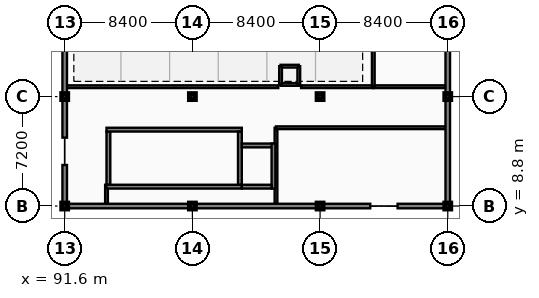
"""IFC4 building model, lengths in metres.
Left out: names, types, materials, properties, quantities, classifications, styles, units other than length and angle.
Written with IfcOpenShell. Run it as: python <this file> out.ifc"""

import sys

from ifc_helpers import new_model, si_unit, direction, frame, frame_2d, origin, origin_2d, place, context, subcontext, project, spatial, rectangle, extrude, element, fill, save


model = new_model("IFC4")
c1 = context("Model", 3, precision=1e-05, world=origin(), true_north=direction((0.0, 1.0)))
c2 = subcontext(c1, "Body", "Model", "MODEL_VIEW")
j1 = project(units=[si_unit("LENGTHUNIT", "METRE"), si_unit("PLANEANGLEUNIT", "RADIAN")], contexts=[c1])
p1 = place(None, origin())
s1 = spatial("IfcSite", under=j1, at=p1, CompositionType="ELEMENT")
p2 = place(p1, origin())
s2 = spatial("IfcBuilding", under=s1, at=p2, CompositionType="ELEMENT")
p3 = place(p2, frame((0.0, 0.0, 13.8)))
s3 = spatial("IfcBuildingStorey", under=s2, at=p3, CompositionType="ELEMENT", Elevation=13.8)
for number, where, z_axis, x_axis in (
    (1, (91.6, 8.8, 0.0), (0.0, 0.0, 1.0), (1.0, 0.0, 0.0)),
    (2, (91.6, 16.0, 0.0), (0.0, 0.0, 1.0), (1.0, 0.0, 0.0)),
    (3, (100.0, 8.8, 0.0), (0.0, 0.0, 1.0), (1.0, 0.0, 0.0)),
    (4, (100.0, 16.0, 0.0), (0.0, 0.0, 1.0), (1.0, 0.0, 0.0)),
    (5, (108.4, 8.8, 0.0), (0.0, 0.0, 1.0), (1.0, 0.0, 0.0)),
    (6, (108.4, 16.0, 0.0), (0.0, 0.0, 1.0), (1.0, 0.0, 0.0)),
    (7, (116.8, 8.8, 0.0), (0.0, 0.0, 1.0), (1.0, 0.0, 0.0)),
    (8, (116.8, 16.0, 0.0), (0.0, 0.0, 1.0), (1.0, 0.0, 0.0)),
):
    element("IfcColumn", number, at=place(p3, frame(where, z_axis=z_axis, x_axis=x_axis)), inside=s3, PredefinedType="COLUMN", context=c2, shape_type="SweptSolid", body=[
        extrude(rectangle(XDim=0.4, YDim=0.4, at=origin_2d()), origin(), (0.0, 0.0, 1.0), 3.9),
    ])
p4 = place(p3, frame((94.35, 8.96, 0.0), z_axis=(0.0, 0.0, 1.0), x_axis=(0.0, 1.0, 0.0)))
e9 = element("IfcWall", 9, at=p4, inside=s3, PredefinedType="PARTITIONING", context=c2, shape_type="SweptSolid", body=[
    extrude(rectangle(XDim=1.24, YDim=0.18, at=frame_2d((0.62, 0.0))), origin(), (0.0, 0.0, 1.0), 3.01),
])
p5 = place(p3, frame((105.5, 8.94, 0.0), z_axis=(0.0, 0.0, 1.0), x_axis=(0.0, 1.0, 0.0)))
e10 = element("IfcWall", 10, at=p5, inside=s3, PredefinedType="PARTITIONING", context=c2, shape_type="SweptSolid", body=[
    extrude(rectangle(XDim=5.01, YDim=0.18, at=frame_2d((2.505, 0.0))), origin(), (0.0, 0.0, 1.0), 3.01),
])
p6 = place(p3, frame((105.5, 13.95, 0.0), z_axis=(0.0, 0.0, 1.0), x_axis=(1.0, 0.0, 0.0)))
e11 = element("IfcWall", 11, at=p6, inside=s3, PredefinedType="PARTITIONING", context=c2, shape_type="SweptSolid", body=[
    extrude(rectangle(XDim=11.16, YDim=0.18, at=frame_2d((5.58, 0.0))), origin(), (0.0, 0.0, 1.0), 3.09),
])
p7 = place(p6, frame((5.08, 0.0, -0.01)))
e12 = element("IfcOpeningElement", 12, at=p7, cuts=e11, PredefinedType="OPENING", context=c2, shape_type="SweptSolid", body=[
    extrude(rectangle(XDim=1.0, YDim=2.16, at=frame_2d((0.5, 1.08))), frame((0.0, 0.1, 0.0), z_axis=(0.0, -1.0, 0.0), x_axis=(1.0, 0.0, 0.0)), (0.0, 0.0, 1.0), 0.2),
])
p8 = place(p3, frame((91.74, 16.65, 0.0), z_axis=(0.0, 0.0, 1.0), x_axis=(1.0, 0.0, 0.0)))
e13 = element("IfcWall", 13, at=p8, inside=s3, PredefinedType="PARTITIONING", context=c2, shape_type="SweptSolid", body=[
    extrude(rectangle(XDim=13.91, YDim=0.18, at=frame_2d((6.955, 0.0))), origin(), (0.0, 0.0, 1.0), 3.09),
])
p9 = place(p8, frame((5.54, 0.0, -0.01)))
e14 = element("IfcOpeningElement", 14, at=p9, cuts=e13, PredefinedType="OPENING", context=c2, shape_type="SweptSolid", body=[
    extrude(rectangle(XDim=1.6, YDim=2.21, at=frame_2d((0.8, 1.105))), frame((0.0, 0.1, 0.0), z_axis=(0.0, -1.0, 0.0), x_axis=(1.0, 0.0, 0.0)), (0.0, 0.0, 1.0), 0.2),
])
p10 = place(p3, frame((107.15, 16.65, 0.0), z_axis=(0.0, 0.0, 1.0), x_axis=(1.0, 0.0, 0.0)))
e15 = element("IfcWall", 15, at=p10, inside=s3, PredefinedType="PARTITIONING", context=c2, shape_type="SweptSolid", body=[
    extrude(rectangle(XDim=4.75, YDim=0.18, at=frame_2d((2.375, 0.0))), origin(), (0.0, 0.0, 1.0), 3.09),
])
p11 = place(p3, frame((111.9, 16.65, 0.0), z_axis=(0.0, 0.0, 1.0), x_axis=(1.0, 0.0, 0.0)))
e16 = element("IfcWall", 16, at=p11, inside=s3, PredefinedType="PARTITIONING", context=c2, shape_type="SweptSolid", body=[
    extrude(rectangle(XDim=4.76, YDim=0.18, at=frame_2d((2.38, 0.0))), origin(), (0.0, 0.0, 1.0), 3.09),
])
p12 = place(p11, frame((1.88, 0.0, -0.01)))
e17 = element("IfcOpeningElement", 17, at=p12, cuts=e16, PredefinedType="OPENING", context=c2, shape_type="SweptSolid", body=[
    extrude(rectangle(XDim=1.0, YDim=2.16, at=frame_2d((0.5, 1.08))), frame((0.0, 0.1, 0.0), z_axis=(0.0, -1.0, 0.0), x_axis=(1.0, 0.0, 0.0)), (0.0, 0.0, 1.0), 0.2),
])
p13 = place(p3, frame((111.9, 16.65, 0.0), z_axis=(0.0, 0.0, 1.0), x_axis=(0.0, 1.0, 0.0)))
e18 = element("IfcWall", 18, at=p13, inside=s3, PredefinedType="PARTITIONING", context=c2, shape_type="SweptSolid", body=[
    extrude(rectangle(XDim=6.41, YDim=0.18, at=frame_2d((3.205, 0.0))), origin(), (0.0, 0.0, 1.0), 3.01),
])
p14 = place(p3, frame((91.6, 8.8, 0.0), z_axis=(0.0, 0.0, 1.0), x_axis=(1.0, 0.0, 0.0)))
e19 = element("IfcWall", 19, at=p14, inside=s3, PredefinedType="SOLIDWALL", context=c2, shape_type="SweptSolid", body=[
    extrude(rectangle(XDim=8.4, YDim=0.3, at=frame_2d((4.2, 0.0))), origin(), (0.0, 0.0, 1.0), 3.01),
])
p15 = place(p14, frame((0.46, 0.0, 0.85)))
e20 = element("IfcOpeningElement", 20, at=p15, cuts=e19, PredefinedType="OPENING", context=c2, shape_type="SweptSolid", body=[
    extrude(rectangle(XDim=0.9, YDim=2.02, at=frame_2d((0.45, 1.01))), frame((0.0, 0.16, 0.0), z_axis=(0.0, -1.0, 0.0), x_axis=(1.0, 0.0, 0.0)), (0.0, 0.0, 1.0), 0.32),
])
p16 = place(p14, frame((6.86, 0.0, 0.85)))
e21 = element("IfcOpeningElement", 21, at=p16, cuts=e19, PredefinedType="OPENING", context=c2, shape_type="SweptSolid", body=[
    extrude(rectangle(XDim=0.9, YDim=2.02, at=frame_2d((0.45, 1.01))), frame((0.0, 0.16, 0.0), z_axis=(0.0, -1.0, 0.0), x_axis=(1.0, 0.0, 0.0)), (0.0, 0.0, 1.0), 0.32),
])
p17 = place(p3, frame((100.0, 8.8, 0.0), z_axis=(0.0, 0.0, 1.0), x_axis=(1.0, 0.0, 0.0)))
e22 = element("IfcWall", 22, at=p17, inside=s3, PredefinedType="SOLIDWALL", context=c2, shape_type="SweptSolid", body=[
    extrude(rectangle(XDim=8.4, YDim=0.3, at=frame_2d((4.2, 0.0))), origin(), (0.0, 0.0, 1.0), 3.01),
])
p18 = place(p17, frame((0.46, 0.0, 0.85)))
e23 = element("IfcOpeningElement", 23, at=p18, cuts=e22, PredefinedType="OPENING", context=c2, shape_type="SweptSolid", body=[
    extrude(rectangle(XDim=0.9, YDim=2.02, at=frame_2d((0.45, 1.01))), frame((0.0, 0.16, 0.0), z_axis=(0.0, -1.0, 0.0), x_axis=(1.0, 0.0, 0.0)), (0.0, 0.0, 1.0), 0.32),
])
p19 = place(p17, frame((6.86, 0.0, 0.85)))
e24 = element("IfcOpeningElement", 24, at=p19, cuts=e22, PredefinedType="OPENING", context=c2, shape_type="SweptSolid", body=[
    extrude(rectangle(XDim=0.9, YDim=2.02, at=frame_2d((0.45, 1.01))), frame((0.0, 0.16, 0.0), z_axis=(0.0, -1.0, 0.0), x_axis=(1.0, 0.0, 0.0)), (0.0, 0.0, 1.0), 0.32),
])
for number, where, z_axis, x_axis in (
    (25, (108.4, 8.8, 0.0), (0.0, 0.0, 1.0), (1.0, 0.0, 0.0)),
    (26, (113.5, 8.8, 0.0), (0.0, 0.0, 1.0), (1.0, 0.0, 0.0)),
):
    element("IfcWall", number, at=place(p3, frame(where, z_axis=z_axis, x_axis=x_axis)), inside=s3, PredefinedType="SOLIDWALL", context=c2, shape_type="SweptSolid", body=[
        extrude(rectangle(XDim=3.3, YDim=0.3, at=frame_2d((1.65, 0.0))), origin(), (0.0, 0.0, 1.0), 3.01),
    ])
for number, where, z_axis, x_axis in (
    (27, (91.6, 16.0, 0.0), (0.0, 0.0, 1.0), (0.0, -1.0, 0.0)),
    (28, (91.6, 11.5, 0.0), (0.0, 0.0, 1.0), (0.0, -1.0, 0.0)),
):
    element("IfcWall", number, at=place(p3, frame(where, z_axis=z_axis, x_axis=x_axis)), inside=s3, PredefinedType="SOLIDWALL", context=c2, shape_type="SweptSolid", body=[
        extrude(rectangle(XDim=2.7, YDim=0.3, at=frame_2d((1.35, 0.0))), origin(), (0.0, 0.0, 1.0), 3.01),
    ])
p20 = place(p3, frame((91.6, 23.2, 0.0), z_axis=(0.0, 0.0, 1.0), x_axis=(0.0, -1.0, 0.0)))
e29 = element("IfcWall", 29, at=p20, inside=s3, PredefinedType="SOLIDWALL", context=c2, shape_type="SweptSolid", body=[
    extrude(rectangle(XDim=7.2, YDim=0.3, at=frame_2d((3.6, 0.0))), origin(), (0.0, 0.0, 1.0), 3.01),
])
p21 = place(p20, frame((0.46, 0.0, 0.85)))
e30 = element("IfcOpeningElement", 30, at=p21, cuts=e29, PredefinedType="OPENING", context=c2, shape_type="SweptSolid", body=[
    extrude(rectangle(XDim=0.9, YDim=2.02, at=frame_2d((0.45, 1.01))), frame((0.0, 0.16, 0.0), z_axis=(0.0, -1.0, 0.0), x_axis=(1.0, 0.0, 0.0)), (0.0, 0.0, 1.0), 0.32),
])
p22 = place(p20, frame((5.26, 0.0, 0.85)))
e31 = element("IfcOpeningElement", 31, at=p22, cuts=e29, PredefinedType="OPENING", context=c2, shape_type="SweptSolid", body=[
    extrude(rectangle(XDim=0.9, YDim=2.02, at=frame_2d((0.45, 1.01))), frame((0.0, 0.16, 0.0), z_axis=(0.0, -1.0, 0.0), x_axis=(1.0, 0.0, 0.0)), (0.0, 0.0, 1.0), 0.32),
])
p23 = place(p3, frame((116.8, 8.8, 0.0), z_axis=(0.0, 0.0, 1.0), x_axis=(0.0, 1.0, 0.0)))
e32 = element("IfcWall", 32, at=p23, inside=s3, PredefinedType="SOLIDWALL", context=c2, shape_type="SweptSolid", body=[
    extrude(rectangle(XDim=7.2, YDim=0.3, at=frame_2d((3.6, 0.0))), origin(), (0.0, 0.0, 1.0), 3.01),
])
p24 = place(p23, frame((0.46, 0.0, 0.85)))
e33 = element("IfcOpeningElement", 33, at=p24, cuts=e32, PredefinedType="OPENING", context=c2, shape_type="SweptSolid", body=[
    extrude(rectangle(XDim=0.9, YDim=2.02, at=frame_2d((0.45, 1.01))), frame((0.0, 0.16, 0.0), z_axis=(0.0, -1.0, 0.0), x_axis=(1.0, 0.0, 0.0)), (0.0, 0.0, 1.0), 0.32),
])
p25 = place(p23, frame((5.66, 0.0, 0.85)))
e34 = element("IfcOpeningElement", 34, at=p25, cuts=e32, PredefinedType="OPENING", context=c2, shape_type="SweptSolid", body=[
    extrude(rectangle(XDim=0.9, YDim=2.02, at=frame_2d((0.45, 1.01))), frame((0.0, 0.16, 0.0), z_axis=(0.0, -1.0, 0.0), x_axis=(1.0, 0.0, 0.0)), (0.0, 0.0, 1.0), 0.32),
])
p26 = place(p3, frame((116.8, 16.0, 0.0), z_axis=(0.0, 0.0, 1.0), x_axis=(0.0, 1.0, 0.0)))
e35 = element("IfcWall", 35, at=p26, inside=s3, PredefinedType="SOLIDWALL", context=c2, shape_type="SweptSolid", body=[
    extrude(rectangle(XDim=7.2, YDim=0.3, at=frame_2d((3.6, 0.0))), origin(), (0.0, 0.0, 1.0), 3.01),
])
p27 = place(p26, frame((0.86, 0.0, 0.85)))
e36 = element("IfcOpeningElement", 36, at=p27, cuts=e35, PredefinedType="OPENING", context=c2, shape_type="SweptSolid", body=[
    extrude(rectangle(XDim=0.9, YDim=2.02, at=frame_2d((0.45, 1.01))), frame((0.0, 0.16, 0.0), z_axis=(0.0, -1.0, 0.0), x_axis=(1.0, 0.0, 0.0)), (0.0, 0.0, 1.0), 0.32),
])
p28 = place(p26, frame((5.66, 0.0, 0.85)))
e37 = element("IfcOpeningElement", 37, at=p28, cuts=e35, PredefinedType="OPENING", context=c2, shape_type="SweptSolid", body=[
    extrude(rectangle(XDim=0.9, YDim=2.02, at=frame_2d((0.45, 1.01))), frame((0.0, 0.16, 0.0), z_axis=(0.0, -1.0, 0.0), x_axis=(1.0, 0.0, 0.0)), (0.0, 0.0, 1.0), 0.32),
])
p29 = place(p3, frame((94.475, 13.7, 0.0), z_axis=(0.0, 0.0, 1.0), x_axis=(0.0, -1.0, 0.0)))
e38 = element("IfcWall", 38, at=p29, inside=s3, PredefinedType="SHEAR", context=c2, shape_type="SweptSolid", body=[
    extrude(rectangle(XDim=3.5, YDim=0.25, at=frame_2d((1.75, 0.0))), origin(), (0.0, 0.0, 1.0), 3.9),
])
p30 = place(p29, frame((1.1, 0.0, -0.01)))
e39 = element("IfcOpeningElement", 39, at=p30, cuts=e38, PredefinedType="OPENING", context=c2, shape_type="SweptSolid", body=[
    extrude(rectangle(XDim=1.3, YDim=2.16, at=frame_2d((0.65, 1.08))), frame((0.0, 0.135, 0.0), z_axis=(0.0, -1.0, 0.0), x_axis=(1.0, 0.0, 0.0)), (0.0, 0.0, 1.0), 0.27),
])
for number, where, z_axis, x_axis in (
    (40, (94.35, 10.075, 0.0), (0.0, 0.0, 1.0), (1.0, 0.0, 0.0)),
    (41, (94.35, 13.825, 0.0), (0.0, 0.0, 1.0), (1.0, 0.0, 0.0)),
):
    element("IfcWall", number, at=place(p3, frame(where, z_axis=z_axis, x_axis=x_axis)), inside=s3, PredefinedType="SHEAR", context=c2, shape_type="SweptSolid", body=[
        extrude(rectangle(XDim=8.9, YDim=0.25, at=frame_2d((4.45, 0.0))), origin(), (0.0, 0.0, 1.0), 3.9),
    ])
p31 = place(p3, frame((103.125, 10.2, 0.0), z_axis=(0.0, 0.0, 1.0), x_axis=(0.0, 1.0, 0.0)))
e42 = element("IfcWall", 42, at=p31, inside=s3, PredefinedType="SHEAR", context=c2, shape_type="SweptSolid", body=[
    extrude(rectangle(XDim=3.5, YDim=0.25, at=frame_2d((1.75, 0.0))), origin(), (0.0, 0.0, 1.0), 3.9),
])
p32 = place(p3, frame((103.25, 12.785, 0.0), z_axis=(0.0, 0.0, 1.0), x_axis=(1.0, 0.0, 0.0)))
e43 = element("IfcWall", 43, at=p32, inside=s3, PredefinedType="SHEAR", context=c2, shape_type="SweptSolid", body=[
    extrude(rectangle(XDim=2.21, YDim=0.25, at=frame_2d((1.105, 0.0))), origin(), (0.0, 0.0, 1.0), 3.9),
])
p33 = place(p3, frame((105.335, 9.95, 0.0), z_axis=(0.0, 0.0, 1.0), x_axis=(0.0, 1.0, 0.0)))
e44 = element("IfcWall", 44, at=p33, inside=s3, PredefinedType="SHEAR", context=c2, shape_type="SweptSolid", body=[
    extrude(rectangle(XDim=2.96, YDim=0.25, at=frame_2d((1.48, 0.0))), origin(), (0.0, 0.0, 1.0), 3.9),
])
p34 = place(p3, frame((103.25, 10.075, 0.0), z_axis=(0.0, 0.0, 1.0), x_axis=(1.0, 0.0, 0.0)))
e45 = element("IfcWall", 45, at=p34, inside=s3, PredefinedType="SHEAR", context=c2, shape_type="SweptSolid", body=[
    extrude(rectangle(XDim=1.96, YDim=0.25, at=frame_2d((0.98, 0.0))), origin(), (0.0, 0.0, 1.0), 3.9),
])
p35 = place(p34, frame((0.43, 0.0, -0.01)))
e46 = element("IfcOpeningElement", 46, at=p35, cuts=e45, PredefinedType="OPENING", context=c2, shape_type="SweptSolid", body=[
    extrude(rectangle(XDim=1.1, YDim=2.16, at=frame_2d((0.55, 1.08))), frame((0.0, 0.135, 0.0), z_axis=(0.0, -1.0, 0.0), x_axis=(1.0, 0.0, 0.0)), (0.0, 0.0, 1.0), 0.27),
])
p36 = place(p3, frame((105.8, 16.8, 0.0), z_axis=(0.0, 0.0, 1.0), x_axis=(1.0, 0.0, 0.0)))
e47 = element("IfcWall", 47, at=p36, inside=s3, PredefinedType="SOLIDWALL", context=c2, shape_type="SweptSolid", body=[
    extrude(rectangle(XDim=1.2, YDim=0.18, at=frame_2d((0.6, 0.0))), origin(), (0.0, 0.0, 1.0), 3.69),
])
p37 = place(p36, frame((0.2, 0.0, -0.01)))
e48 = element("IfcOpeningElement", 48, at=p37, cuts=e47, PredefinedType="OPENING", context=c2, shape_type="SweptSolid", body=[
    extrude(rectangle(XDim=0.8, YDim=2.06, at=frame_2d((0.4, 1.03))), frame((0.0, 0.1, 0.0), z_axis=(0.0, -1.0, 0.0), x_axis=(1.0, 0.0, 0.0)), (0.0, 0.0, 1.0), 0.2),
])
for number, where, z_axis, x_axis in (
    (49, (107.0, 16.8, 0.0), (0.0, 0.0, 1.0), (0.0, 1.0, 0.0)),
    (50, (107.0, 18.0, 0.0), (0.0, 0.0, 1.0), (-1.0, 0.0, 0.0)),
    (51, (105.8, 18.0, 0.0), (0.0, 0.0, 1.0), (0.0, -1.0, 0.0)),
):
    element("IfcWall", number, at=place(p3, frame(where, z_axis=z_axis, x_axis=x_axis)), inside=s3, PredefinedType="SOLIDWALL", context=c2, shape_type="SweptSolid", body=[
        extrude(rectangle(XDim=1.2, YDim=0.18, at=frame_2d((0.6, 0.0))), origin(), (0.0, 0.0, 1.0), 3.69),
    ])
p38 = place(p7, frame((1.0, 0.0, 0.01), z_axis=(0.0, 0.0, 1.0), x_axis=(-1.0, 0.0, 0.0)))
e52 = element("IfcDoor", 52, at=p38, inside=s3, OperationType="SINGLE_SWING_LEFT", PredefinedType="DOOR", context=c2, shape_type="SweptSolid", body=[
    extrude(rectangle(XDim=1.0, YDim=2.15, at=frame_2d((0.5, 1.075))), frame((0.0, 0.025, 0.0), z_axis=(0.0, -1.0, 0.0), x_axis=(1.0, 0.0, 0.0)), (0.0, 0.0, 1.0), 0.05),
])
fill(e12, e52)
p39 = place(p9, frame((0.0, 0.0, 0.01)))
e53 = element("IfcDoor", 53, at=p39, inside=s3, OperationType="DOUBLE_SWING_LEFT", PredefinedType="DOOR", context=c2, shape_type="SweptSolid", body=[
    extrude(rectangle(XDim=1.6, YDim=2.2, at=frame_2d((0.8, 1.1))), frame((0.0, 0.025, 0.0), z_axis=(0.0, -1.0, 0.0), x_axis=(1.0, 0.0, 0.0)), (0.0, 0.0, 1.0), 0.05),
])
fill(e14, e53)
p40 = place(p12, frame((0.0, 0.0, 0.01)))
e54 = element("IfcDoor", 54, at=p40, inside=s3, OperationType="SINGLE_SWING_LEFT", PredefinedType="DOOR", context=c2, shape_type="SweptSolid", body=[
    extrude(rectangle(XDim=1.0, YDim=2.15, at=frame_2d((0.5, 1.075))), frame((0.0, 0.025, 0.0), z_axis=(0.0, -1.0, 0.0), x_axis=(1.0, 0.0, 0.0)), (0.0, 0.0, 1.0), 0.05),
])
fill(e17, e54)
p41 = place(p15, origin())
e55 = element("IfcWindow", 55, at=p41, inside=s3, PartitioningType="SINGLE_PANEL", PredefinedType="WINDOW", context=c2, shape_type="SweptSolid", body=[
    extrude(rectangle(XDim=0.9, YDim=2.02, at=frame_2d((0.45, 1.01))), frame((0.0, 0.03, 0.0), z_axis=(0.0, -1.0, 0.0), x_axis=(1.0, 0.0, 0.0)), (0.0, 0.0, 1.0), 0.06),
])
fill(e20, e55)
p42 = place(p16, origin())
e56 = element("IfcWindow", 56, at=p42, inside=s3, PartitioningType="SINGLE_PANEL", PredefinedType="WINDOW", context=c2, shape_type="SweptSolid", body=[
    extrude(rectangle(XDim=0.9, YDim=2.02, at=frame_2d((0.45, 1.01))), frame((0.0, 0.03, 0.0), z_axis=(0.0, -1.0, 0.0), x_axis=(1.0, 0.0, 0.0)), (0.0, 0.0, 1.0), 0.06),
])
fill(e21, e56)
p43 = place(p18, origin())
e57 = element("IfcWindow", 57, at=p43, inside=s3, PartitioningType="SINGLE_PANEL", PredefinedType="WINDOW", context=c2, shape_type="SweptSolid", body=[
    extrude(rectangle(XDim=0.9, YDim=2.02, at=frame_2d((0.45, 1.01))), frame((0.0, 0.03, 0.0), z_axis=(0.0, -1.0, 0.0), x_axis=(1.0, 0.0, 0.0)), (0.0, 0.0, 1.0), 0.06),
])
fill(e23, e57)
p44 = place(p19, origin())
e58 = element("IfcWindow", 58, at=p44, inside=s3, PartitioningType="SINGLE_PANEL", PredefinedType="WINDOW", context=c2, shape_type="SweptSolid", body=[
    extrude(rectangle(XDim=0.9, YDim=2.02, at=frame_2d((0.45, 1.01))), frame((0.0, 0.03, 0.0), z_axis=(0.0, -1.0, 0.0), x_axis=(1.0, 0.0, 0.0)), (0.0, 0.0, 1.0), 0.06),
])
fill(e24, e58)
p45 = place(p22, origin())
e59 = element("IfcWindow", 59, at=p45, inside=s3, PartitioningType="SINGLE_PANEL", PredefinedType="WINDOW", context=c2, shape_type="SweptSolid", body=[
    extrude(rectangle(XDim=0.9, YDim=2.02, at=frame_2d((0.45, 1.01))), frame((0.0, 0.03, 0.0), z_axis=(0.0, -1.0, 0.0), x_axis=(1.0, 0.0, 0.0)), (0.0, 0.0, 1.0), 0.06),
])
fill(e31, e59)
p46 = place(p24, origin())
e60 = element("IfcWindow", 60, at=p46, inside=s3, PartitioningType="SINGLE_PANEL", PredefinedType="WINDOW", context=c2, shape_type="SweptSolid", body=[
    extrude(rectangle(XDim=0.9, YDim=2.02, at=frame_2d((0.45, 1.01))), frame((0.0, 0.03, 0.0), z_axis=(0.0, -1.0, 0.0), x_axis=(1.0, 0.0, 0.0)), (0.0, 0.0, 1.0), 0.06),
])
fill(e33, e60)
p47 = place(p25, origin())
e61 = element("IfcWindow", 61, at=p47, inside=s3, PartitioningType="SINGLE_PANEL", PredefinedType="WINDOW", context=c2, shape_type="SweptSolid", body=[
    extrude(rectangle(XDim=0.9, YDim=2.02, at=frame_2d((0.45, 1.01))), frame((0.0, 0.03, 0.0), z_axis=(0.0, -1.0, 0.0), x_axis=(1.0, 0.0, 0.0)), (0.0, 0.0, 1.0), 0.06),
])
fill(e34, e61)
p48 = place(p27, origin())
e62 = element("IfcWindow", 62, at=p48, inside=s3, PartitioningType="SINGLE_PANEL", PredefinedType="WINDOW", context=c2, shape_type="SweptSolid", body=[
    extrude(rectangle(XDim=0.9, YDim=2.02, at=frame_2d((0.45, 1.01))), frame((0.0, 0.03, 0.0), z_axis=(0.0, -1.0, 0.0), x_axis=(1.0, 0.0, 0.0)), (0.0, 0.0, 1.0), 0.06),
])
fill(e36, e62)
p49 = place(p30, frame((1.3, 0.0, 0.01), z_axis=(0.0, 0.0, 1.0), x_axis=(-1.0, 0.0, 0.0)))
e63 = element("IfcDoor", 63, at=p49, inside=s3, OperationType="SINGLE_SWING_LEFT", PredefinedType="DOOR", context=c2, shape_type="SweptSolid", body=[
    extrude(rectangle(XDim=1.3, YDim=2.15, at=frame_2d((0.65, 1.075))), frame((0.0, 0.025, 0.0), z_axis=(0.0, -1.0, 0.0), x_axis=(1.0, 0.0, 0.0)), (0.0, 0.0, 1.0), 0.05),
])
fill(e39, e63)
p50 = place(p35, frame((0.0, 0.0, 0.01)))
e64 = element("IfcDoor", 64, at=p50, inside=s3, OperationType="SLIDING_TO_LEFT", PredefinedType="DOOR", context=c2, shape_type="SweptSolid", body=[
    extrude(rectangle(XDim=1.1, YDim=2.15, at=frame_2d((0.55, 1.075))), frame((0.0, 0.025, 0.0), z_axis=(0.0, -1.0, 0.0), x_axis=(1.0, 0.0, 0.0)), (0.0, 0.0, 1.0), 0.05),
])
fill(e46, e64)
p51 = place(p37, frame((0.0, 0.0, 0.01)))
e65 = element("IfcDoor", 65, at=p51, inside=s3, OperationType="SINGLE_SWING_LEFT", PredefinedType="DOOR", context=c2, shape_type="SweptSolid", body=[
    extrude(rectangle(XDim=0.8, YDim=2.05, at=frame_2d((0.4, 1.025))), frame((0.0, 0.025, 0.0), z_axis=(0.0, -1.0, 0.0), x_axis=(1.0, 0.0, 0.0)), (0.0, 0.0, 1.0), 0.05),
])
fill(e48, e65)
save(model, sys.argv[1])
